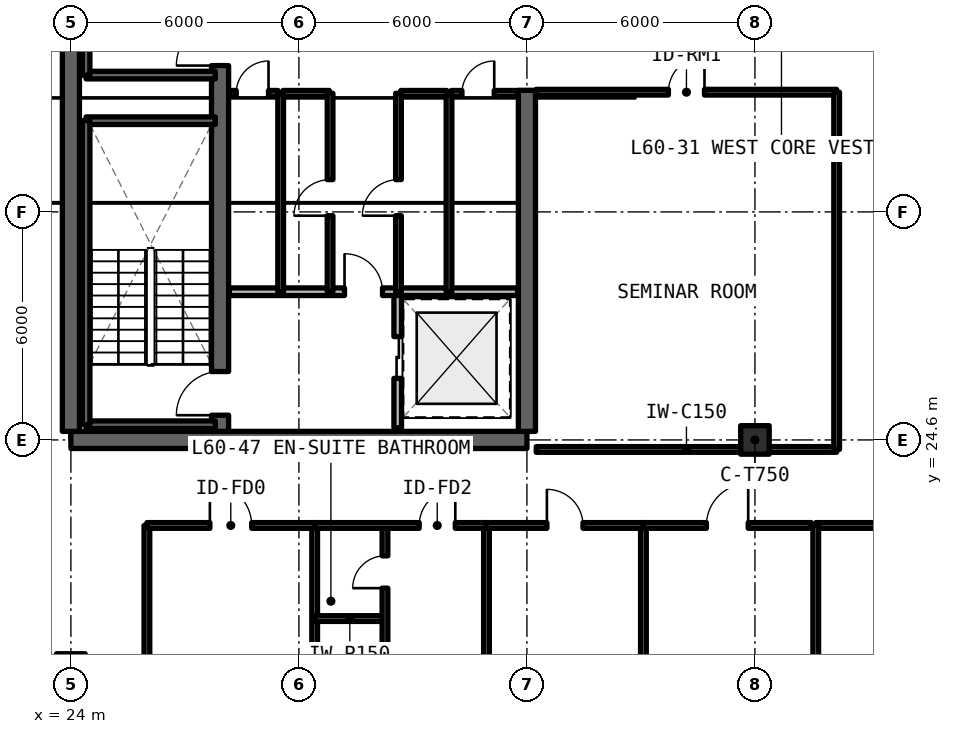
"""IFC4 building model, lengths in metres.
Left out: names, types, materials, properties, quantities, classifications, styles, units other than length and angle.
Written with IfcOpenShell. Run it as: python <this file> out.ifc"""

import sys

from ifc_helpers import new_model, si_unit, direction, frame, frame_2d, origin, origin_2d, place, context, subcontext, project, spatial, rectangle, extrude, element, fill, save


model = new_model("IFC4")
c1 = context("Model", 3, precision=1e-05, world=origin(), true_north=direction((0.0, 1.0)))
c2 = subcontext(c1, "Body", "Model", "MODEL_VIEW")
j1 = project(units=[si_unit("LENGTHUNIT", "METRE"), si_unit("PLANEANGLEUNIT", "RADIAN")], contexts=[c1])
p1 = place(None, origin())
s1 = spatial("IfcSite", under=j1, at=p1, CompositionType="ELEMENT")
p2 = place(p1, origin())
s2 = spatial("IfcBuilding", under=s1, at=p2, CompositionType="ELEMENT")
p3 = place(p2, frame((0.0, 0.0, 215.49)))
s3 = spatial("IfcBuildingStorey", under=s2, at=p3, CompositionType="ELEMENT", Elevation=215.49)
p4 = place(p3, frame((24.0, 24.6, 0.0), z_axis=(0.0, 0.0, 1.0), x_axis=(1.0, 0.0, 0.0)))
e1 = element("IfcWall", 1, at=p4, inside=s3, PredefinedType="SHEAR", context=c2, shape_type="SweptSolid", body=[
    extrude(rectangle(XDim=12.0, YDim=0.45, at=frame_2d((6.0, 0.0))), origin(), (0.0, 0.0, 1.0), 3.63),
])
p5 = place(p3, frame((24.0, 24.825, 0.0), z_axis=(0.0, 0.0, 1.0), x_axis=(0.0, 1.0, 0.0)))
e2 = element("IfcWall", 2, at=p5, inside=s3, PredefinedType="SHEAR", context=c2, shape_type="SweptSolid", body=[
    extrude(rectangle(XDim=17.55, YDim=0.45, at=frame_2d((8.775, 0.0))), origin(), (0.0, 0.0, 1.0), 3.63),
])
p6 = place(p3, frame((36.0, 24.825, 0.0), z_axis=(0.0, 0.0, 1.0), x_axis=(0.0, 1.0, 0.0)))
e3 = element("IfcWall", 3, at=p6, inside=s3, PredefinedType="SHEAR", context=c2, shape_type="SweptSolid", body=[
    extrude(rectangle(XDim=8.975, YDim=0.45, at=frame_2d((4.488, 0.0))), origin(), (0.0, 0.0, 1.0), 3.63),
])
p7 = place(p3, frame((27.925, 24.825, 0.0), z_axis=(0.0, 0.0, 1.0), x_axis=(0.0, 1.0, 0.0)))
e4 = element("IfcWall", 4, at=p7, inside=s3, PredefinedType="SHEAR", context=c2, shape_type="SweptSolid", body=[
    extrude(rectangle(XDim=17.55, YDim=0.45, at=frame_2d((8.775, 0.0))), origin(), (0.0, 0.0, 1.0), 3.63),
])
p8 = place(p7, frame((0.425, 0.0, 0.0)))
e5 = element("IfcOpeningElement", 5, at=p8, cuts=e4, PredefinedType="OPENING", context=c2, shape_type="SweptSolid", body=[
    extrude(rectangle(XDim=1.15, YDim=2.15, at=frame_2d((0.575, 1.075))), frame((0.0, 0.235, 0.0), z_axis=(0.0, -1.0, 0.0), x_axis=(1.0, 0.0, 0.0)), (0.0, 0.0, 1.0), 0.47),
])
p9 = place(p7, frame((9.625, 0.0, 0.0)))
e6 = element("IfcOpeningElement", 6, at=p9, cuts=e4, PredefinedType="OPENING", context=c2, shape_type="SweptSolid", body=[
    extrude(rectangle(XDim=1.15, YDim=2.15, at=frame_2d((0.575, 1.075))), frame((0.0, 0.235, 0.0), z_axis=(0.0, -1.0, 0.0), x_axis=(1.0, 0.0, 0.0)), (0.0, 0.0, 1.0), 0.47),
])
for number, where, z_axis, x_axis in (
    (7, (42.0, 24.6, 0.0), (0.0, 0.0, 1.0), (1.0, 0.0, 0.0)),
    (8, (24.0, 18.6, 0.0), (0.0, 0.0, 1.0), (1.0, 0.0, 0.0)),
):
    element("IfcColumn", number, at=place(p3, frame(where, z_axis=z_axis, x_axis=x_axis)), inside=s3, PredefinedType="COLUMN", context=c2, shape_type="SweptSolid", body=[
        extrude(rectangle(XDim=0.75, YDim=0.75, at=origin_2d()), origin(), (0.0, 0.0, 1.0), 3.63),
    ])
p10 = place(p3, frame((32.6, 24.92, 0.0), z_axis=(0.0, 0.0, 1.0), x_axis=(0.0, 1.0, 0.0)))
e9 = element("IfcWall", 9, at=p10, inside=s3, PredefinedType="SOLIDWALL", context=c2, shape_type="SweptSolid", body=[
    extrude(rectangle(XDim=3.58, YDim=0.2, at=frame_2d((1.79, 0.0))), origin(), (0.0, 0.0, 1.0), 2.63),
])
p11 = place(p10, frame((1.3, 0.0, 0.0)))
e10 = element("IfcOpeningElement", 10, at=p11, cuts=e9, PredefinedType="OPENING", context=c2, shape_type="SweptSolid", body=[
    extrude(rectangle(XDim=1.1, YDim=2.2, at=frame_2d((0.55, 1.1))), frame((0.0, 0.11, 0.0), z_axis=(0.0, -1.0, 0.0), x_axis=(1.0, 0.0, 0.0)), (0.0, 0.0, 1.0), 0.22),
])
p12 = place(p3, frame((28.17, 28.5, 0.0), z_axis=(0.0, 0.0, 1.0), x_axis=(1.0, 0.0, 0.0)))
e11 = element("IfcWall", 11, at=p12, inside=s3, PredefinedType="SOLIDWALL", context=c2, shape_type="SweptSolid", body=[
    extrude(rectangle(XDim=7.585, YDim=0.2, at=frame_2d((3.792, 0.0))), origin(), (0.0, 0.0, 1.0), 2.63),
])
p13 = place(p12, frame((3.03, 0.0, 0.0)))
e12 = element("IfcOpeningElement", 12, at=p13, cuts=e11, PredefinedType="OPENING", context=c2, shape_type="SweptSolid", body=[
    extrude(rectangle(XDim=1.0, YDim=2.15, at=frame_2d((0.5, 1.075))), frame((0.0, 0.11, 0.0), z_axis=(0.0, -1.0, 0.0), x_axis=(1.0, 0.0, 0.0)), (0.0, 0.0, 1.0), 0.22),
])
p14 = place(p3, frame((29.52, 28.5, 0.0), z_axis=(0.0, 0.0, 1.0), x_axis=(0.0, 1.0, 0.0)))
e13 = element("IfcWall", 13, at=p14, inside=s3, PredefinedType="SOLIDWALL", context=c2, shape_type="SweptSolid", body=[
    extrude(rectangle(XDim=5.22, YDim=0.15, at=frame_2d((2.61, 0.0))), origin(), (0.0, 0.0, 1.0), 2.63),
])
p15 = place(p3, frame((28.17, 33.72, 0.0), z_axis=(0.0, 0.0, 1.0), x_axis=(1.0, 0.0, 0.0)))
e14 = element("IfcWall", 14, at=p15, inside=s3, PredefinedType="SOLIDWALL", context=c2, shape_type="SweptSolid", body=[
    extrude(rectangle(XDim=1.28, YDim=0.15, at=frame_2d((0.64, 0.0))), origin(), (0.0, 0.0, 1.0), 2.63),
])
p16 = place(p15, frame((0.18, 0.0, 0.0)))
e15 = element("IfcOpeningElement", 15, at=p16, cuts=e14, PredefinedType="OPENING", context=c2, shape_type="SweptSolid", body=[
    extrude(rectangle(XDim=0.85, YDim=2.1, at=frame_2d((0.425, 1.05))), frame((0.0, 0.085, 0.0), z_axis=(0.0, -1.0, 0.0), x_axis=(1.0, 0.0, 0.0)), (0.0, 0.0, 1.0), 0.17),
])
p17 = place(p3, frame((29.58, 33.72, 0.0), z_axis=(0.0, 0.0, 1.0), x_axis=(1.0, 0.0, 0.0)))
e16 = element("IfcWall", 16, at=p17, inside=s3, PredefinedType="SOLIDWALL", context=c2, shape_type="SweptSolid", body=[
    extrude(rectangle(XDim=1.22, YDim=0.15, at=frame_2d((0.61, 0.0))), origin(), (0.0, 0.0, 1.0), 2.63),
])
p18 = place(p3, frame((30.82, 28.5, 0.0), z_axis=(0.0, 0.0, 1.0), x_axis=(0.0, 1.0, 0.0)))
e17 = element("IfcWall", 17, at=p18, inside=s3, PredefinedType="SOLIDWALL", context=c2, shape_type="SweptSolid", body=[
    extrude(rectangle(XDim=5.22, YDim=0.15, at=frame_2d((2.61, 0.0))), origin(), (0.0, 0.0, 1.0), 2.63),
])
p19 = place(p18, frame((2.0, 0.0, 0.0)))
e18 = element("IfcOpeningElement", 18, at=p19, cuts=e17, PredefinedType="OPENING", context=c2, shape_type="SweptSolid", body=[
    extrude(rectangle(XDim=0.95, YDim=2.15, at=frame_2d((0.475, 1.075))), frame((0.0, 0.085, 0.0), z_axis=(0.0, -1.0, 0.0), x_axis=(1.0, 0.0, 0.0)), (0.0, 0.0, 1.0), 0.17),
])
p20 = place(p3, frame((33.95, 28.5, 0.0), z_axis=(0.0, 0.0, 1.0), x_axis=(0.0, 1.0, 0.0)))
e19 = element("IfcWall", 19, at=p20, inside=s3, PredefinedType="SOLIDWALL", context=c2, shape_type="SweptSolid", body=[
    extrude(rectangle(XDim=5.22, YDim=0.15, at=frame_2d((2.61, 0.0))), origin(), (0.0, 0.0, 1.0), 2.63),
])
p21 = place(p3, frame((32.68, 33.72, 0.0), z_axis=(0.0, 0.0, 1.0), x_axis=(1.0, 0.0, 0.0)))
e20 = element("IfcWall", 20, at=p21, inside=s3, PredefinedType="SOLIDWALL", context=c2, shape_type="SweptSolid", body=[
    extrude(rectangle(XDim=1.21, YDim=0.15, at=frame_2d((0.605, 0.0))), origin(), (0.0, 0.0, 1.0), 2.63),
])
p22 = place(p3, frame((34.01, 33.72, 0.0), z_axis=(0.0, 0.0, 1.0), x_axis=(1.0, 0.0, 0.0)))
e21 = element("IfcWall", 21, at=p22, inside=s3, PredefinedType="SOLIDWALL", context=c2, shape_type="SweptSolid", body=[
    extrude(rectangle(XDim=1.745, YDim=0.15, at=frame_2d((0.873, 0.0))), origin(), (0.0, 0.0, 1.0), 2.63),
])
p23 = place(p22, frame((0.28, 0.0, 0.0)))
e22 = element("IfcOpeningElement", 22, at=p23, cuts=e21, PredefinedType="OPENING", context=c2, shape_type="SweptSolid", body=[
    extrude(rectangle(XDim=0.85, YDim=2.1, at=frame_2d((0.425, 1.05))), frame((0.0, 0.085, 0.0), z_axis=(0.0, -1.0, 0.0), x_axis=(1.0, 0.0, 0.0)), (0.0, 0.0, 1.0), 0.17),
])
p24 = place(p3, frame((32.62, 28.5, 0.0), z_axis=(0.0, 0.0, 1.0), x_axis=(0.0, 1.0, 0.0)))
e23 = element("IfcWall", 23, at=p24, inside=s3, PredefinedType="SOLIDWALL", context=c2, shape_type="SweptSolid", body=[
    extrude(rectangle(XDim=5.22, YDim=0.15, at=frame_2d((2.61, 0.0))), origin(), (0.0, 0.0, 1.0), 2.63),
])
p25 = place(p24, frame((2.0, 0.0, 0.0)))
e24 = element("IfcOpeningElement", 24, at=p25, cuts=e23, PredefinedType="OPENING", context=c2, shape_type="SweptSolid", body=[
    extrude(rectangle(XDim=0.95, YDim=2.15, at=frame_2d((0.475, 1.075))), frame((0.0, 0.085, 0.0), z_axis=(0.0, -1.0, 0.0), x_axis=(1.0, 0.0, 0.0)), (0.0, 0.0, 1.0), 0.17),
])
p26 = place(p3, frame((36.245, 24.35, 0.0), z_axis=(0.0, 0.0, 1.0), x_axis=(1.0, 0.0, 0.0)))
e25 = element("IfcWall", 25, at=p26, inside=s3, PredefinedType="SOLIDWALL", context=c2, shape_type="SweptSolid", body=[
    extrude(rectangle(XDim=7.905, YDim=0.15, at=frame_2d((3.952, 0.0))), origin(), (0.0, 0.0, 1.0), 2.63),
])
p27 = place(p3, frame((36.245, 33.75, 0.0), z_axis=(0.0, 0.0, 1.0), x_axis=(1.0, 0.0, 0.0)))
e26 = element("IfcWall", 26, at=p27, inside=s3, PredefinedType="SOLIDWALL", context=c2, shape_type="SweptSolid", body=[
    extrude(rectangle(XDim=7.905, YDim=0.15, at=frame_2d((3.952, 0.0))), origin(), (0.0, 0.0, 1.0), 2.63),
])
p28 = place(p27, frame((3.478, 0.0, 0.0)))
e27 = element("IfcOpeningElement", 27, at=p28, cuts=e26, PredefinedType="OPENING", context=c2, shape_type="SweptSolid", body=[
    extrude(rectangle(XDim=0.95, YDim=2.15, at=frame_2d((0.475, 1.075))), frame((0.0, 0.085, 0.0), z_axis=(0.0, -1.0, 0.0), x_axis=(1.0, 0.0, 0.0)), (0.0, 0.0, 1.0), 0.17),
])
p29 = place(p3, frame((44.15, 24.35, 0.0), z_axis=(0.0, 0.0, 1.0), x_axis=(0.0, 1.0, 0.0)))
e28 = element("IfcWall", 28, at=p29, inside=s3, PredefinedType="SOLIDWALL", context=c2, shape_type="SweptSolid", body=[
    extrude(rectangle(XDim=9.4, YDim=0.15, at=frame_2d((4.7, 0.0))), origin(), (0.0, 0.0, 1.0), 2.63),
])
p30 = place(p3, frame((43.6, 22.35, 0.0), z_axis=(0.0, 0.0, 1.0), x_axis=(1.0, 0.0, 0.0)))
e29 = element("IfcWall", 29, at=p30, inside=s3, PredefinedType="SOLIDWALL", context=c2, shape_type="SweptSolid", body=[
    extrude(rectangle(XDim=8.4, YDim=0.15, at=frame_2d((4.2, 0.0))), origin(), (0.0, 0.0, 1.0), 2.63),
])
p31 = place(p30, frame((3.65, 0.0, 0.0)))
e30 = element("IfcOpeningElement", 30, at=p31, cuts=e29, PredefinedType="OPENING", context=c2, shape_type="SweptSolid", body=[
    extrude(rectangle(XDim=1.1, YDim=2.15, at=frame_2d((0.55, 1.075))), frame((0.0, 0.085, 0.0), z_axis=(0.0, -1.0, 0.0), x_axis=(1.0, 0.0, 0.0)), (0.0, 0.0, 1.0), 0.17),
])
for number, where, z_axis, x_axis in (
    (31, (43.6, 12.27, 0.0), (0.0, 0.0, 1.0), (0.0, 1.0, 0.0)),
    (32, (26.0, 12.27, 0.0), (0.0, 0.0, 1.0), (0.0, 1.0, 0.0)),
    (33, (30.415, 12.27, 0.0), (0.0, 0.0, 1.0), (0.0, 1.0, 0.0)),
):
    element("IfcWall", number, at=place(p3, frame(where, z_axis=z_axis, x_axis=x_axis)), inside=s3, PredefinedType="SOLIDWALL", context=c2, shape_type="SweptSolid", body=[
        extrude(rectangle(XDim=10.08, YDim=0.15, at=frame_2d((5.04, 0.0))), origin(), (0.0, 0.0, 1.0), 2.63),
    ])
p32 = place(p3, frame((26.0, 22.35, 0.0), z_axis=(0.0, 0.0, 1.0), x_axis=(1.0, 0.0, 0.0)))
e34 = element("IfcWall", 34, at=p32, inside=s3, PredefinedType="SOLIDWALL", context=c2, shape_type="SweptSolid", body=[
    extrude(rectangle(XDim=4.415, YDim=0.15, at=frame_2d((2.207, 0.0))), origin(), (0.0, 0.0, 1.0), 2.63),
])
p33 = place(p32, frame((1.657, 0.0, 0.0)))
e35 = element("IfcOpeningElement", 35, at=p33, cuts=e34, PredefinedType="OPENING", context=c2, shape_type="SweptSolid", body=[
    extrude(rectangle(XDim=1.1, YDim=2.15, at=frame_2d((0.55, 1.075))), frame((0.0, 0.085, 0.0), z_axis=(0.0, -1.0, 0.0), x_axis=(1.0, 0.0, 0.0)), (0.0, 0.0, 1.0), 0.17),
])
p34 = place(p3, frame((34.936, 12.27, 0.0), z_axis=(0.0, 0.0, 1.0), x_axis=(0.0, 1.0, 0.0)))
e36 = element("IfcWall", 36, at=p34, inside=s3, PredefinedType="SOLIDWALL", context=c2, shape_type="SweptSolid", body=[
    extrude(rectangle(XDim=10.08, YDim=0.15, at=frame_2d((5.04, 0.0))), origin(), (0.0, 0.0, 1.0), 2.63),
])
p35 = place(p3, frame((30.415, 19.9, 0.0), z_axis=(0.0, 0.0, 1.0), x_axis=(1.0, 0.0, 0.0)))
e37 = element("IfcWall", 37, at=p35, inside=s3, PredefinedType="PARTITIONING", context=c2, shape_type="SweptSolid", body=[
    extrude(rectangle(XDim=1.85, YDim=0.15, at=frame_2d((0.925, 0.0))), origin(), (0.0, 0.0, 1.0), 2.63),
])
p36 = place(p3, frame((32.264, 12.27, 0.0), z_axis=(0.0, 0.0, 1.0), x_axis=(0.0, 1.0, 0.0)))
e38 = element("IfcWall", 38, at=p36, inside=s3, PredefinedType="PARTITIONING", context=c2, shape_type="SweptSolid", body=[
    extrude(rectangle(XDim=10.08, YDim=0.15, at=frame_2d((5.04, 0.0))), origin(), (0.0, 0.0, 1.0), 2.63),
])
p37 = place(p36, frame((2.912, 0.0, 0.0)))
e39 = element("IfcOpeningElement", 39, at=p37, cuts=e38, PredefinedType="OPENING", context=c2, shape_type="SweptSolid", body=[
    extrude(rectangle(XDim=0.85, YDim=2.1, at=frame_2d((0.425, 1.05))), frame((0.0, 0.085, 0.0), z_axis=(0.0, -1.0, 0.0), x_axis=(1.0, 0.0, 0.0)), (0.0, 0.0, 1.0), 0.17),
])
p38 = place(p36, frame((8.43, 0.0, 0.0)))
e40 = element("IfcOpeningElement", 40, at=p38, cuts=e38, PredefinedType="OPENING", context=c2, shape_type="SweptSolid", body=[
    extrude(rectangle(XDim=0.85, YDim=2.1, at=frame_2d((0.425, 1.05))), frame((0.0, 0.085, 0.0), z_axis=(0.0, -1.0, 0.0), x_axis=(1.0, 0.0, 0.0)), (0.0, 0.0, 1.0), 0.17),
])
p39 = place(p3, frame((30.415, 22.35, 0.0), z_axis=(0.0, 0.0, 1.0), x_axis=(1.0, 0.0, 0.0)))
e41 = element("IfcWall", 41, at=p39, inside=s3, PredefinedType="SOLIDWALL", context=c2, shape_type="SweptSolid", body=[
    extrude(rectangle(XDim=4.521, YDim=0.15, at=frame_2d((2.261, 0.0))), origin(), (0.0, 0.0, 1.0), 2.63),
])
p40 = place(p39, frame((2.75, 0.0, 0.0)))
e42 = element("IfcOpeningElement", 42, at=p40, cuts=e41, PredefinedType="OPENING", context=c2, shape_type="SweptSolid", body=[
    extrude(rectangle(XDim=0.95, YDim=2.15, at=frame_2d((0.475, 1.075))), frame((0.0, 0.085, 0.0), z_axis=(0.0, -1.0, 0.0), x_axis=(1.0, 0.0, 0.0)), (0.0, 0.0, 1.0), 0.17),
])
p41 = place(p3, frame((39.065, 12.27, 0.0), z_axis=(0.0, 0.0, 1.0), x_axis=(0.0, 1.0, 0.0)))
e43 = element("IfcWall", 43, at=p41, inside=s3, PredefinedType="SOLIDWALL", context=c2, shape_type="SweptSolid", body=[
    extrude(rectangle(XDim=10.08, YDim=0.15, at=frame_2d((5.04, 0.0))), origin(), (0.0, 0.0, 1.0), 2.63),
])
p42 = place(p3, frame((34.936, 22.35, 0.0), z_axis=(0.0, 0.0, 1.0), x_axis=(1.0, 0.0, 0.0)))
e44 = element("IfcWall", 44, at=p42, inside=s3, PredefinedType="SOLIDWALL", context=c2, shape_type="SweptSolid", body=[
    extrude(rectangle(XDim=4.13, YDim=0.15, at=frame_2d((2.065, 0.0))), origin(), (0.0, 0.0, 1.0), 2.63),
])
p43 = place(p42, frame((1.59, 0.0, 0.0)))
e45 = element("IfcOpeningElement", 45, at=p43, cuts=e44, PredefinedType="OPENING", context=c2, shape_type="SweptSolid", body=[
    extrude(rectangle(XDim=0.95, YDim=2.15, at=frame_2d((0.475, 1.075))), frame((0.0, 0.085, 0.0), z_axis=(0.0, -1.0, 0.0), x_axis=(1.0, 0.0, 0.0)), (0.0, 0.0, 1.0), 0.17),
])
p44 = place(p3, frame((39.065, 22.35, 0.0), z_axis=(0.0, 0.0, 1.0), x_axis=(1.0, 0.0, 0.0)))
e46 = element("IfcWall", 46, at=p44, inside=s3, PredefinedType="SOLIDWALL", context=c2, shape_type="SweptSolid", body=[
    extrude(rectangle(XDim=4.415, YDim=0.15, at=frame_2d((2.207, 0.0))), origin(), (0.0, 0.0, 1.0), 2.63),
])
p45 = place(p44, frame((1.657, 0.0, 0.0)))
e47 = element("IfcOpeningElement", 47, at=p45, cuts=e46, PredefinedType="OPENING", context=c2, shape_type="SweptSolid", body=[
    extrude(rectangle(XDim=1.1, YDim=2.15, at=frame_2d((0.55, 1.075))), frame((0.0, 0.085, 0.0), z_axis=(0.0, -1.0, 0.0), x_axis=(1.0, 0.0, 0.0)), (0.0, 0.0, 1.0), 0.17),
])
for number, where, z_axis, x_axis in (
    (48, (24.4, 25.0, 0.0), (0.0, 0.0, 1.0), (1.0, 0.0, 0.0)),
    (49, (27.8, 33.0, 0.0), (0.0, 0.0, 1.0), (-1.0, 0.0, 0.0)),
):
    element("IfcWall", number, at=place(p3, frame(where, z_axis=z_axis, x_axis=x_axis)), inside=s3, PredefinedType="SOLIDWALL", context=c2, shape_type="SweptSolid", body=[
        extrude(rectangle(XDim=3.4, YDim=0.2, at=frame_2d((1.7, 0.0))), origin(), (0.0, 0.0, 1.0), 3.63),
    ])
p46 = place(p3, frame((24.4, 33.0, 0.0), z_axis=(0.0, 0.0, 1.0), x_axis=(0.0, -1.0, 0.0)))
e50 = element("IfcWall", 50, at=p46, inside=s3, PredefinedType="SOLIDWALL", context=c2, shape_type="SweptSolid", body=[
    extrude(rectangle(XDim=8.0, YDim=0.2, at=frame_2d((4.0, 0.0))), origin(), (0.0, 0.0, 1.0), 3.63),
])
p47 = place(p3, frame((24.4, 34.2, 0.0), z_axis=(0.0, 0.0, 1.0), x_axis=(1.0, 0.0, 0.0)))
e51 = element("IfcWall", 51, at=p47, inside=s3, PredefinedType="SOLIDWALL", context=c2, shape_type="SweptSolid", body=[
    extrude(rectangle(XDim=3.4, YDim=0.2, at=frame_2d((1.7, 0.0))), origin(), (0.0, 0.0, 1.0), 3.63),
])
p48 = place(p3, frame((24.4, 42.2, 0.0), z_axis=(0.0, 0.0, 1.0), x_axis=(0.0, -1.0, 0.0)))
e52 = element("IfcWall", 52, at=p48, inside=s3, PredefinedType="SOLIDWALL", context=c2, shape_type="SweptSolid", body=[
    extrude(rectangle(XDim=8.0, YDim=0.2, at=frame_2d((4.0, 0.0))), origin(), (0.0, 0.0, 1.0), 3.63),
])
p49 = place(p11, origin())
e53 = element("IfcDoor", 53, at=p49, inside=s3, OperationType="SLIDING_TO_LEFT", PredefinedType="DOOR", context=c2, shape_type="SweptSolid", body=[
    extrude(rectangle(XDim=1.1, YDim=2.2, at=frame_2d((0.55, 1.1))), frame((0.0, 0.025, 0.0), z_axis=(0.0, -1.0, 0.0), x_axis=(1.0, 0.0, 0.0)), (0.0, 0.0, 1.0), 0.05),
])
fill(e10, e53)
p50 = place(p13, origin())
e54 = element("IfcDoor", 54, at=p50, inside=s3, OperationType="SINGLE_SWING_LEFT", PredefinedType="DOOR", context=c2, shape_type="SweptSolid", body=[
    extrude(rectangle(XDim=1.0, YDim=2.15, at=frame_2d((0.5, 1.075))), frame((0.0, 0.025, 0.0), z_axis=(0.0, -1.0, 0.0), x_axis=(1.0, 0.0, 0.0)), (0.0, 0.0, 1.0), 0.05),
])
fill(e12, e54)
p51 = place(p16, origin())
e55 = element("IfcDoor", 55, at=p51, inside=s3, OperationType="SINGLE_SWING_RIGHT", PredefinedType="DOOR", context=c2, shape_type="SweptSolid", body=[
    extrude(rectangle(XDim=0.85, YDim=2.1, at=frame_2d((0.425, 1.05))), frame((0.0, 0.025, 0.0), z_axis=(0.0, -1.0, 0.0), x_axis=(1.0, 0.0, 0.0)), (0.0, 0.0, 1.0), 0.05),
])
fill(e15, e55)
p52 = place(p19, origin())
e56 = element("IfcDoor", 56, at=p52, inside=s3, OperationType="SINGLE_SWING_LEFT", PredefinedType="DOOR", context=c2, shape_type="SweptSolid", body=[
    extrude(rectangle(XDim=0.95, YDim=2.15, at=frame_2d((0.475, 1.075))), frame((0.0, 0.025, 0.0), z_axis=(0.0, -1.0, 0.0), x_axis=(1.0, 0.0, 0.0)), (0.0, 0.0, 1.0), 0.05),
])
fill(e18, e56)
p53 = place(p23, origin())
e57 = element("IfcDoor", 57, at=p53, inside=s3, OperationType="SINGLE_SWING_RIGHT", PredefinedType="DOOR", context=c2, shape_type="SweptSolid", body=[
    extrude(rectangle(XDim=0.85, YDim=2.1, at=frame_2d((0.425, 1.05))), frame((0.0, 0.025, 0.0), z_axis=(0.0, -1.0, 0.0), x_axis=(1.0, 0.0, 0.0)), (0.0, 0.0, 1.0), 0.05),
])
fill(e22, e57)
p54 = place(p25, origin())
e58 = element("IfcDoor", 58, at=p54, inside=s3, OperationType="SINGLE_SWING_LEFT", PredefinedType="DOOR", context=c2, shape_type="SweptSolid", body=[
    extrude(rectangle(XDim=0.95, YDim=2.15, at=frame_2d((0.475, 1.075))), frame((0.0, 0.025, 0.0), z_axis=(0.0, -1.0, 0.0), x_axis=(1.0, 0.0, 0.0)), (0.0, 0.0, 1.0), 0.05),
])
fill(e24, e58)
p55 = place(p28, origin())
e59 = element("IfcDoor", 59, at=p55, inside=s3, OperationType="SINGLE_SWING_RIGHT", PredefinedType="DOOR", context=c2, shape_type="SweptSolid", body=[
    extrude(rectangle(XDim=0.95, YDim=2.15, at=frame_2d((0.475, 1.075))), frame((0.0, 0.025, 0.0), z_axis=(0.0, -1.0, 0.0), x_axis=(1.0, 0.0, 0.0)), (0.0, 0.0, 1.0), 0.05),
])
fill(e27, e59)
p56 = place(p33, origin())
e60 = element("IfcDoor", 60, at=p56, inside=s3, OperationType="SINGLE_SWING_LEFT", PredefinedType="DOOR", context=c2, shape_type="SweptSolid", body=[
    extrude(rectangle(XDim=1.1, YDim=2.15, at=frame_2d((0.55, 1.075))), frame((0.0, 0.025, 0.0), z_axis=(0.0, -1.0, 0.0), x_axis=(1.0, 0.0, 0.0)), (0.0, 0.0, 1.0), 0.05),
])
fill(e35, e60)
p57 = place(p38, origin())
e61 = element("IfcDoor", 61, at=p57, inside=s3, OperationType="SINGLE_SWING_LEFT", PredefinedType="DOOR", context=c2, shape_type="SweptSolid", body=[
    extrude(rectangle(XDim=0.85, YDim=2.1, at=frame_2d((0.425, 1.05))), frame((0.0, 0.025, 0.0), z_axis=(0.0, -1.0, 0.0), x_axis=(1.0, 0.0, 0.0)), (0.0, 0.0, 1.0), 0.05),
])
fill(e40, e61)
p58 = place(p40, origin())
e62 = element("IfcDoor", 62, at=p58, inside=s3, OperationType="SINGLE_SWING_RIGHT", PredefinedType="DOOR", context=c2, shape_type="SweptSolid", body=[
    extrude(rectangle(XDim=0.95, YDim=2.15, at=frame_2d((0.475, 1.075))), frame((0.0, 0.025, 0.0), z_axis=(0.0, -1.0, 0.0), x_axis=(1.0, 0.0, 0.0)), (0.0, 0.0, 1.0), 0.05),
])
fill(e42, e62)
p59 = place(p43, origin())
e63 = element("IfcDoor", 63, at=p59, inside=s3, OperationType="SINGLE_SWING_LEFT", PredefinedType="DOOR", context=c2, shape_type="SweptSolid", body=[
    extrude(rectangle(XDim=0.95, YDim=2.15, at=frame_2d((0.475, 1.075))), frame((0.0, 0.025, 0.0), z_axis=(0.0, -1.0, 0.0), x_axis=(1.0, 0.0, 0.0)), (0.0, 0.0, 1.0), 0.05),
])
fill(e45, e63)
p60 = place(p45, origin())
e64 = element("IfcDoor", 64, at=p60, inside=s3, OperationType="SINGLE_SWING_RIGHT", PredefinedType="DOOR", context=c2, shape_type="SweptSolid", body=[
    extrude(rectangle(XDim=1.1, YDim=2.15, at=frame_2d((0.55, 1.075))), frame((0.0, 0.025, 0.0), z_axis=(0.0, -1.0, 0.0), x_axis=(1.0, 0.0, 0.0)), (0.0, 0.0, 1.0), 0.05),
])
fill(e47, e64)
p61 = place(p8, origin())
e65 = element("IfcDoor", 65, at=p61, inside=s3, OperationType="SINGLE_SWING_RIGHT", PredefinedType="DOOR", context=c2, shape_type="SweptSolid", body=[
    extrude(rectangle(XDim=1.15, YDim=2.15, at=frame_2d((0.575, 1.075))), frame((0.0, 0.025, 0.0), z_axis=(0.0, -1.0, 0.0), x_axis=(1.0, 0.0, 0.0)), (0.0, 0.0, 1.0), 0.05),
])
fill(e5, e65)
p62 = place(p9, origin())
e66 = element("IfcDoor", 66, at=p62, inside=s3, OperationType="SINGLE_SWING_LEFT", PredefinedType="DOOR", context=c2, shape_type="SweptSolid", body=[
    extrude(rectangle(XDim=1.15, YDim=2.15, at=frame_2d((0.575, 1.075))), frame((0.0, 0.025, 0.0), z_axis=(0.0, -1.0, 0.0), x_axis=(1.0, 0.0, 0.0)), (0.0, 0.0, 1.0), 0.05),
])
fill(e6, e66)
save(model, sys.argv[1])
